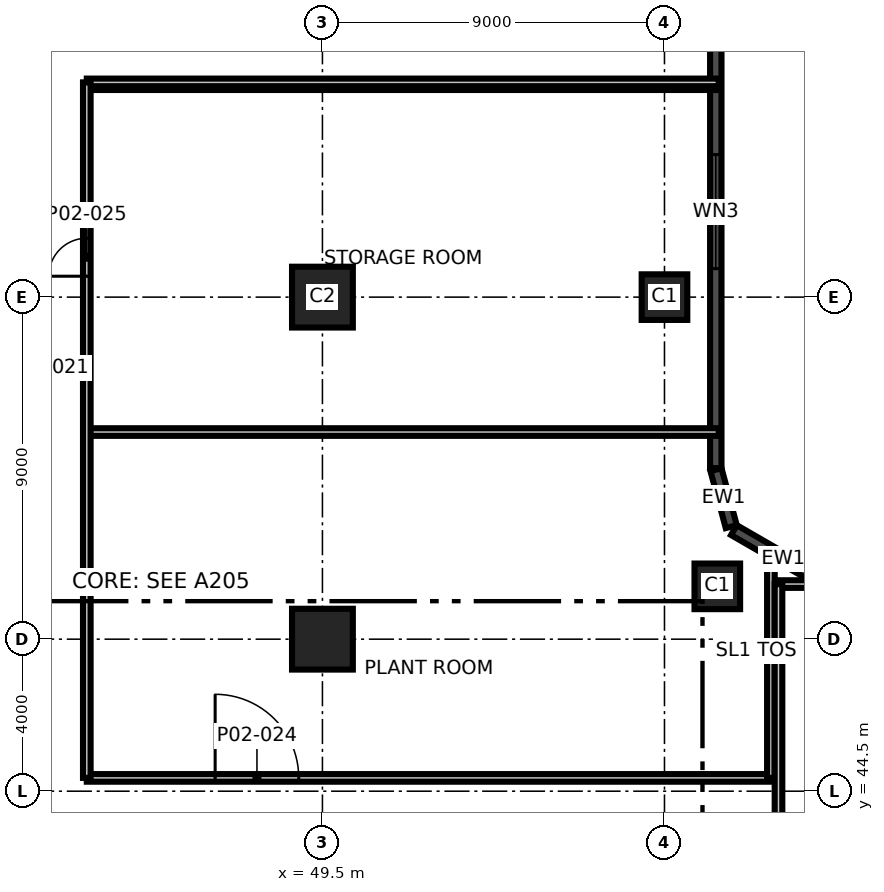
"""IFC4 building model, lengths in metres.
Left out: names, types, materials, properties, quantities, classifications, styles, units other than length and angle.
Written with IfcOpenShell. Run it as: python <this file> out.ifc"""

import sys

from ifc_helpers import new_model, si_unit, direction, frame, frame_2d, origin, origin_2d, place, context, subcontext, project, spatial, rectangle, extrude, element, fill, save


model = new_model("IFC4")
c1 = context("Model", 3, precision=1e-05, world=origin(), true_north=direction((0.0, 1.0)))
c2 = subcontext(c1, "Body", "Model", "MODEL_VIEW")
j1 = project(units=[si_unit("LENGTHUNIT", "METRE"), si_unit("PLANEANGLEUNIT", "RADIAN")], contexts=[c1])
p1 = place(None, origin())
s1 = spatial("IfcSite", under=j1, at=p1, CompositionType="ELEMENT")
p2 = place(p1, origin())
s2 = spatial("IfcBuilding", under=s1, at=p2, CompositionType="ELEMENT")
p3 = place(p2, frame((0.0, 0.0, 13.5)))
s3 = spatial("IfcBuildingStorey", under=s2, at=p3, CompositionType="ELEMENT", Elevation=13.5)
p4 = place(p3, frame((49.5, 48.5, 0.0), z_axis=(0.0, 0.0, 1.0), x_axis=(1.0, 0.0, 0.0)))
e1 = element("IfcColumn", 1, at=p4, inside=s3, PredefinedType="COLUMN", context=c2, shape_type="SweptSolid", body=[
    extrude(rectangle(XDim=1.6, YDim=1.6, at=origin_2d()), origin(), (0.0, 0.0, 1.0), 5.0),
])
p5 = place(p3, frame((59.89, 49.89, 0.0), z_axis=(0.0, 0.0, 1.0), x_axis=(1.0, 0.0, 0.0)))
e2 = element("IfcColumn", 2, at=p5, inside=s3, PredefinedType="COLUMN", context=c2, shape_type="SweptSolid", body=[
    extrude(rectangle(XDim=1.2, YDim=1.2, at=origin_2d()), origin(), (0.0, 0.0, 1.0), 5.0),
])
p6 = place(p3, frame((49.5, 57.5, 0.0), z_axis=(0.0, 0.0, 1.0), x_axis=(1.0, 0.0, 0.0)))
e3 = element("IfcColumn", 3, at=p6, inside=s3, PredefinedType="COLUMN", context=c2, shape_type="SweptSolid", body=[
    extrude(rectangle(XDim=1.6, YDim=1.6, at=origin_2d()), origin(), (0.0, 0.0, 1.0), 5.0),
])
p7 = place(p3, frame((58.5, 57.5, 0.0), z_axis=(0.0, 0.0, 1.0), x_axis=(1.0, 0.0, 0.0)))
e4 = element("IfcColumn", 4, at=p7, inside=s3, PredefinedType="COLUMN", context=c2, shape_type="SweptSolid", body=[
    extrude(rectangle(XDim=1.2, YDim=1.2, at=origin_2d()), origin(), (0.0, 0.0, 1.0), 5.0),
])
p8 = place(p3, frame((62.925, 49.87, 0.0), z_axis=(0.0, 0.0, 1.0), x_axis=(-0.866031096941, 0.499990139034, 0.0)))
e5 = element("IfcWall", 5, at=p8, inside=s3, PredefinedType="SOLIDWALL", context=c2, shape_type="SweptSolid", body=[
    extrude(rectangle(XDim=3.0, YDim=0.3, at=frame_2d((1.5, 0.0))), origin(), (0.0, 0.0, 1.0), 4.7),
])
p9 = place(p3, frame((60.257, 51.461, 0.0), z_axis=(0.0, 0.0, 1.0), x_axis=(-0.258777996848, 0.965936824201, 0.0)))
e6 = element("IfcWall", 6, at=p9, inside=s3, PredefinedType="SOLIDWALL", context=c2, shape_type="SweptSolid", body=[
    extrude(rectangle(XDim=1.553, YDim=0.3, at=frame_2d((0.776, 0.0))), origin(), (0.0, 0.0, 1.0), 4.7),
])
p10 = place(p3, frame((59.85, 53.0, 0.0), z_axis=(0.0, 0.0, 1.0), x_axis=(0.0, 1.0, 0.0)))
e7 = element("IfcWall", 7, at=p10, inside=s3, PredefinedType="SOLIDWALL", context=c2, shape_type="SweptSolid", body=[
    extrude(rectangle(XDim=26.928, YDim=0.3, at=frame_2d((13.464, 0.0))), origin(), (0.0, 0.0, 1.0), 4.7),
])
p11 = place(p10, frame((5.25, 0.0, 0.9)))
e8 = element("IfcOpeningElement", 8, at=p11, cuts=e7, PredefinedType="OPENING", context=c2, shape_type="SweptSolid", body=[
    extrude(rectangle(XDim=3.0, YDim=2.4, at=frame_2d((1.5, 1.2))), frame((0.0, 0.16, 0.0), z_axis=(0.0, -1.0, 0.0), x_axis=(1.0, 0.0, 0.0)), (0.0, 0.0, 1.0), 0.32),
])
p12 = place(p10, frame((14.25, 0.0, 0.9)))
e9 = element("IfcOpeningElement", 9, at=p12, cuts=e7, PredefinedType="OPENING", context=c2, shape_type="SweptSolid", body=[
    extrude(rectangle(XDim=3.0, YDim=2.4, at=frame_2d((1.5, 1.2))), frame((0.0, 0.16, 0.0), z_axis=(0.0, -1.0, 0.0), x_axis=(1.0, 0.0, 0.0)), (0.0, 0.0, 1.0), 0.32),
])
p13 = place(p10, frame((18.75, 0.0, 0.9)))
e10 = element("IfcOpeningElement", 10, at=p13, cuts=e7, PredefinedType="OPENING", context=c2, shape_type="SweptSolid", body=[
    extrude(rectangle(XDim=3.0, YDim=2.4, at=frame_2d((1.5, 1.2))), frame((0.0, 0.16, 0.0), z_axis=(0.0, -1.0, 0.0), x_axis=(1.0, 0.0, 0.0)), (0.0, 0.0, 1.0), 0.32),
])
p14 = place(p10, frame((23.25, 0.0, 0.9)))
e11 = element("IfcOpeningElement", 11, at=p14, cuts=e7, PredefinedType="OPENING", context=c2, shape_type="SweptSolid", body=[
    extrude(rectangle(XDim=3.0, YDim=2.4, at=frame_2d((1.5, 1.2))), frame((0.0, 0.16, 0.0), z_axis=(0.0, -1.0, 0.0), x_axis=(1.0, 0.0, 0.0)), (0.0, 0.0, 1.0), 0.32),
])
p15 = place(p3, frame((43.3, 44.85, 0.0), z_axis=(0.0, 0.0, 1.0), x_axis=(1.0, 0.0, 0.0)))
e12 = element("IfcWall", 12, at=p15, inside=s3, PredefinedType="PARTITIONING", context=c2, shape_type="SweptSolid", body=[
    extrude(rectangle(XDim=18.2, YDim=0.2, at=frame_2d((9.1, 0.0))), origin(), (0.0, 0.0, 1.0), 4.7),
])
p16 = place(p15, frame((3.377, 0.0, 0.0)))
e13 = element("IfcOpeningElement", 13, at=p16, cuts=e12, PredefinedType="OPENING", context=c2, shape_type="SweptSolid", body=[
    extrude(rectangle(XDim=2.2, YDim=2.4, at=frame_2d((1.1, 1.2))), frame((0.0, 0.11, 0.0), z_axis=(0.0, -1.0, 0.0), x_axis=(1.0, 0.0, 0.0)), (0.0, 0.0, 1.0), 0.22),
])
p17 = place(p3, frame((61.5, 49.95, 0.0), z_axis=(0.0, 0.0, 1.0), x_axis=(1.0, 0.0, 0.0)))
e14 = element("IfcWall", 14, at=p17, inside=s3, PredefinedType="PARTITIONING", context=c2, shape_type="SweptSolid", body=[
    extrude(rectangle(XDim=1.416, YDim=0.2, at=frame_2d((0.708, 0.0))), origin(), (0.0, 0.0, 1.0), 4.7),
])
for number, where, z_axis, x_axis in (
    (15, (43.3, 53.95, 0.0), (0.0, 0.0, 1.0), (1.0, 0.0, 0.0)),
    (16, (43.3, 63.05, 0.0), (0.0, 0.0, 1.0), (1.0, 0.0, 0.0)),
    (17, (43.3, 63.15, 0.0), (0.0, 0.0, 1.0), (1.0, 0.0, 0.0)),
):
    element("IfcWall", number, at=place(p3, frame(where, z_axis=z_axis, x_axis=x_axis)), inside=s3, PredefinedType="PARTITIONING", context=c2, shape_type="SweptSolid", body=[
        extrude(rectangle(XDim=16.63, YDim=0.2, at=frame_2d((8.315, 0.0))), origin(), (0.0, 0.0, 1.0), 4.7),
    ])
p18 = place(p3, frame((43.3, 44.85, 0.0), z_axis=(0.0, 0.0, 1.0), x_axis=(0.0, 1.0, 0.0)))
e18 = element("IfcWall", 18, at=p18, inside=s3, PredefinedType="PARTITIONING", context=c2, shape_type="SweptSolid", body=[
    extrude(rectangle(XDim=18.3, YDim=0.2, at=frame_2d((9.15, 0.0))), origin(), (0.0, 0.0, 1.0), 4.7),
])
p19 = place(p18, frame((13.2, 0.0, 0.0)))
e19 = element("IfcOpeningElement", 19, at=p19, cuts=e18, PredefinedType="OPENING", context=c2, shape_type="SweptSolid", body=[
    extrude(rectangle(XDim=1.0, YDim=2.1, at=frame_2d((0.5, 1.05))), frame((0.0, 0.11, 0.0), z_axis=(0.0, -1.0, 0.0), x_axis=(1.0, 0.0, 0.0)), (0.0, 0.0, 1.0), 0.22),
])
p20 = place(p3, frame((61.3, 44.85, 0.0), z_axis=(0.0, 0.0, 1.0), x_axis=(0.0, 1.0, 0.0)))
e20 = element("IfcWall", 20, at=p20, inside=s3, PredefinedType="PARTITIONING", context=c2, shape_type="SweptSolid", body=[
    extrude(rectangle(XDim=5.742, YDim=0.2, at=frame_2d((2.871, 0.0))), origin(), (0.0, 0.0, 1.0), 4.7),
])
p21 = place(p3, frame((61.5, 33.5, 0.0), z_axis=(0.0, 0.0, 1.0), x_axis=(0.0, 1.0, 0.0)))
e21 = element("IfcWall", 21, at=p21, inside=s3, PredefinedType="PARTITIONING", context=c2, shape_type="SweptSolid", body=[
    extrude(rectangle(XDim=16.45, YDim=0.2, at=frame_2d((8.225, 0.0))), origin(), (0.0, 0.0, 1.0), 4.7),
])
p22 = place(p11, origin())
e22 = element("IfcWindow", 22, at=p22, inside=s3, PartitioningType="SINGLE_PANEL", PredefinedType="WINDOW", context=c2, shape_type="SweptSolid", body=[
    extrude(rectangle(XDim=3.0, YDim=2.4, at=frame_2d((1.5, 1.2))), frame((0.0, 0.03, 0.0), z_axis=(0.0, -1.0, 0.0), x_axis=(1.0, 0.0, 0.0)), (0.0, 0.0, 1.0), 0.06),
])
fill(e8, e22)
p23 = place(p16, origin())
e23 = element("IfcDoor", 23, at=p23, inside=s3, OperationType="SINGLE_SWING_RIGHT", PredefinedType="DOOR", context=c2, shape_type="SweptSolid", body=[
    extrude(rectangle(XDim=2.2, YDim=2.4, at=frame_2d((1.1, 1.2))), frame((0.0, 0.025, 0.0), z_axis=(0.0, -1.0, 0.0), x_axis=(1.0, 0.0, 0.0)), (0.0, 0.0, 1.0), 0.05),
])
fill(e13, e23)
p24 = place(p19, origin())
e24 = element("IfcDoor", 24, at=p24, inside=s3, OperationType="SINGLE_SWING_LEFT", PredefinedType="DOOR", context=c2, shape_type="SweptSolid", body=[
    extrude(rectangle(XDim=1.0, YDim=2.1, at=frame_2d((0.5, 1.05))), frame((0.0, 0.025, 0.0), z_axis=(0.0, -1.0, 0.0), x_axis=(1.0, 0.0, 0.0)), (0.0, 0.0, 1.0), 0.05),
])
fill(e19, e24)
save(model, sys.argv[1])
